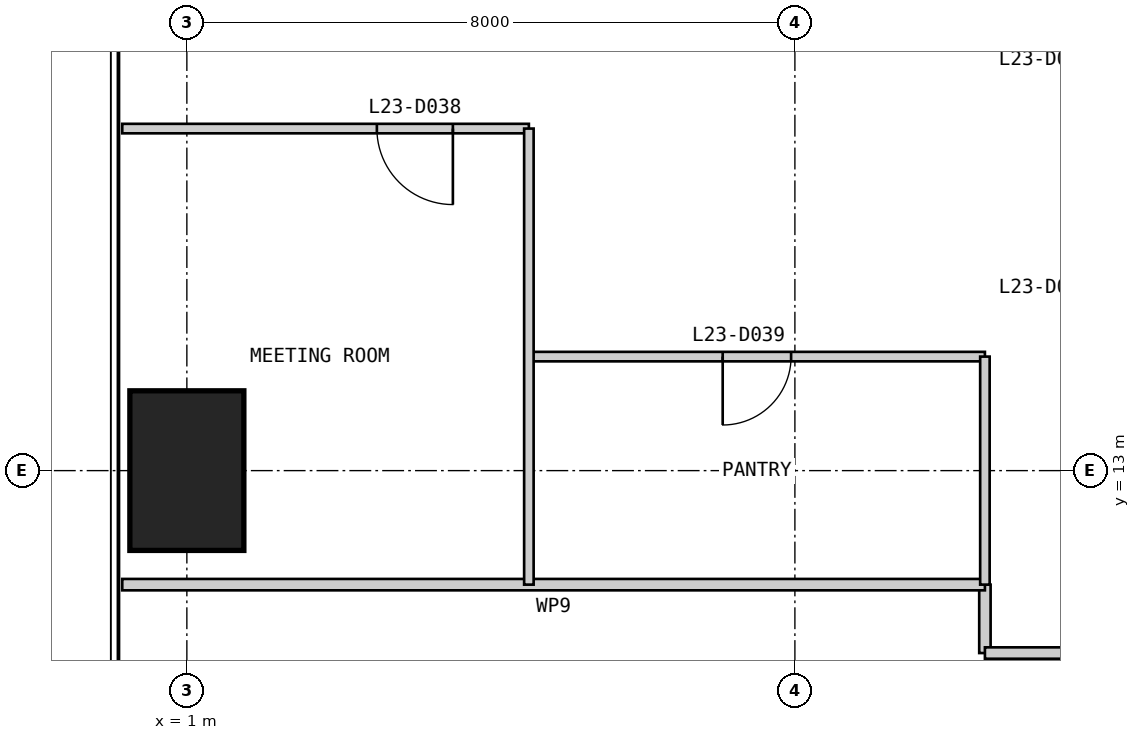
"""IFC4 building model, lengths in metres.
Left out: names, types, materials, properties, quantities, classifications, styles, units other than length and angle.
Written with IfcOpenShell. Run it as: python <this file> out.ifc"""

import sys

from ifc_helpers import new_model, si_unit, direction, frame, frame_2d, origin, origin_2d, place, context, subcontext, project, spatial, rectangle, extrude, element, fill, save


model = new_model("IFC4")
c1 = context("Model", 3, precision=1e-05, world=origin(), true_north=direction((0.0, 1.0)))
c2 = subcontext(c1, "Body", "Model", "MODEL_VIEW")
j1 = project(units=[si_unit("LENGTHUNIT", "METRE"), si_unit("PLANEANGLEUNIT", "RADIAN")], contexts=[c1])
p1 = place(None, origin())
s1 = spatial("IfcSite", under=j1, at=p1, CompositionType="ELEMENT")
p2 = place(p1, origin())
s2 = spatial("IfcBuilding", under=s1, at=p2, CompositionType="ELEMENT")
p3 = place(p2, frame((0.0, 0.0, 102.4)))
s3 = spatial("IfcBuildingStorey", under=s2, at=p3, CompositionType="ELEMENT", Elevation=102.4)
p4 = place(p3, frame((1.0, 13.0, 0.0), z_axis=(0.0, 0.0, 1.0), x_axis=(1.0, 0.0, 0.0)))
e1 = element("IfcColumn", 1, at=p4, inside=s3, PredefinedType="COLUMN", context=c2, shape_type="SweptSolid", body=[
    extrude(rectangle(XDim=1.5, YDim=2.1, at=origin_2d()), origin(), (0.0, 0.0, 1.0), 4.0),
])
p5 = place(p3, frame((11.5, 11.5, 0.0), z_axis=(0.0, 0.0, 1.0), x_axis=(0.0, -1.0, 0.0)))
e2 = element("IfcWall", 2, at=p5, inside=s3, PredefinedType="PARTITIONING", context=c2, shape_type="SweptSolid", body=[
    extrude(rectangle(XDim=0.9, YDim=0.15, at=frame_2d((0.45, 0.0))), origin(), (0.0, 0.0, 1.0), 3.85),
])
p6 = place(p3, frame((11.5, 10.6, 0.0), z_axis=(0.0, 0.0, 1.0), x_axis=(1.0, 0.0, 0.0)))
e3 = element("IfcWall", 3, at=p6, inside=s3, PredefinedType="PARTITIONING", context=c2, shape_type="SweptSolid", body=[
    extrude(rectangle(XDim=27.9, YDim=0.15, at=frame_2d((13.95, 0.0))), origin(), (0.0, 0.0, 1.0), 3.85),
])
p7 = place(p6, frame((12.25, 0.0, 0.0)))
e4 = element("IfcOpeningElement", 4, at=p7, cuts=e3, PredefinedType="OPENING", context=c2, shape_type="SweptSolid", body=[
    extrude(rectangle(XDim=1.0, YDim=2.2, at=frame_2d((0.5, 1.1))), frame((0.0, 0.085, 0.0), z_axis=(0.0, -1.0, 0.0), x_axis=(1.0, 0.0, 0.0)), (0.0, 0.0, 1.0), 0.17),
])
p8 = place(p3, frame((0.15, 11.5, 0.0), z_axis=(0.0, 0.0, 1.0), x_axis=(1.0, 0.0, 0.0)))
e5 = element("IfcWall", 5, at=p8, inside=s3, PredefinedType="PARTITIONING", context=c2, shape_type="SweptSolid", body=[
    extrude(rectangle(XDim=11.35, YDim=0.15, at=frame_2d((5.675, 0.0))), origin(), (0.0, 0.0, 1.0), 3.85),
])
p9 = place(p3, frame((0.15, 17.5, 0.0), z_axis=(0.0, 0.0, 1.0), x_axis=(1.0, 0.0, 0.0)))
e6 = element("IfcWall", 6, at=p9, inside=s3, PredefinedType="PARTITIONING", context=c2, shape_type="SweptSolid", body=[
    extrude(rectangle(XDim=5.35, YDim=0.125, at=frame_2d((2.675, 0.0))), origin(), (0.0, 0.0, 1.0), 3.85),
])
p10 = place(p9, frame((3.35, 0.0, 0.0)))
e7 = element("IfcOpeningElement", 7, at=p10, cuts=e6, PredefinedType="OPENING", context=c2, shape_type="SweptSolid", body=[
    extrude(rectangle(XDim=1.0, YDim=2.2, at=frame_2d((0.5, 1.1))), frame((0.0, 0.073, 0.0), z_axis=(0.0, -1.0, 0.0), x_axis=(1.0, 0.0, 0.0)), (0.0, 0.0, 1.0), 0.145),
])
p11 = place(p3, frame((5.5, 14.5, 0.0), z_axis=(0.0, 0.0, 1.0), x_axis=(1.0, 0.0, 0.0)))
e8 = element("IfcWall", 8, at=p11, inside=s3, PredefinedType="PARTITIONING", context=c2, shape_type="SweptSolid", body=[
    extrude(rectangle(XDim=6.0, YDim=0.125, at=frame_2d((3.0, 0.0))), origin(), (0.0, 0.0, 1.0), 3.85),
])
p12 = place(p11, frame((2.55, 0.0, 0.0)))
e9 = element("IfcOpeningElement", 9, at=p12, cuts=e8, PredefinedType="OPENING", context=c2, shape_type="SweptSolid", body=[
    extrude(rectangle(XDim=0.9, YDim=2.2, at=frame_2d((0.45, 1.1))), frame((0.0, 0.073, 0.0), z_axis=(0.0, -1.0, 0.0), x_axis=(1.0, 0.0, 0.0)), (0.0, 0.0, 1.0), 0.145),
])
p13 = place(p3, frame((5.5, 17.5, 0.0), z_axis=(0.0, 0.0, 1.0), x_axis=(0.0, -1.0, 0.0)))
e10 = element("IfcWall", 10, at=p13, inside=s3, PredefinedType="PARTITIONING", context=c2, shape_type="SweptSolid", body=[
    extrude(rectangle(XDim=6.0, YDim=0.125, at=frame_2d((3.0, 0.0))), origin(), (0.0, 0.0, 1.0), 3.85),
])
p14 = place(p3, frame((11.5, 14.5, 0.0), z_axis=(0.0, 0.0, 1.0), x_axis=(0.0, -1.0, 0.0)))
e11 = element("IfcWall", 11, at=p14, inside=s3, PredefinedType="PARTITIONING", context=c2, shape_type="SweptSolid", body=[
    extrude(rectangle(XDim=3.0, YDim=0.125, at=frame_2d((1.5, 0.0))), origin(), (0.0, 0.0, 1.0), 3.85),
])
p15 = place(p10, frame((1.0, 0.0, 0.0), z_axis=(0.0, 0.0, 1.0), x_axis=(-1.0, 0.0, 0.0)))
e12 = element("IfcDoor", 12, at=p15, inside=s3, OperationType="SINGLE_SWING_LEFT", PredefinedType="DOOR", context=c2, shape_type="SweptSolid", body=[
    extrude(rectangle(XDim=1.0, YDim=2.2, at=frame_2d((0.5, 1.1))), frame((0.0, 0.025, 0.0), z_axis=(0.0, -1.0, 0.0), x_axis=(1.0, 0.0, 0.0)), (0.0, 0.0, 1.0), 0.05),
])
fill(e7, e12)
p16 = place(p12, frame((0.9, 0.0, 0.0), z_axis=(0.0, 0.0, 1.0), x_axis=(-1.0, 0.0, 0.0)))
e13 = element("IfcDoor", 13, at=p16, inside=s3, OperationType="SINGLE_SWING_RIGHT", PredefinedType="DOOR", context=c2, shape_type="SweptSolid", body=[
    extrude(rectangle(XDim=0.9, YDim=2.2, at=frame_2d((0.45, 1.1))), frame((0.0, 0.025, 0.0), z_axis=(0.0, -1.0, 0.0), x_axis=(1.0, 0.0, 0.0)), (0.0, 0.0, 1.0), 0.05),
])
fill(e9, e13)
save(model, sys.argv[1])
